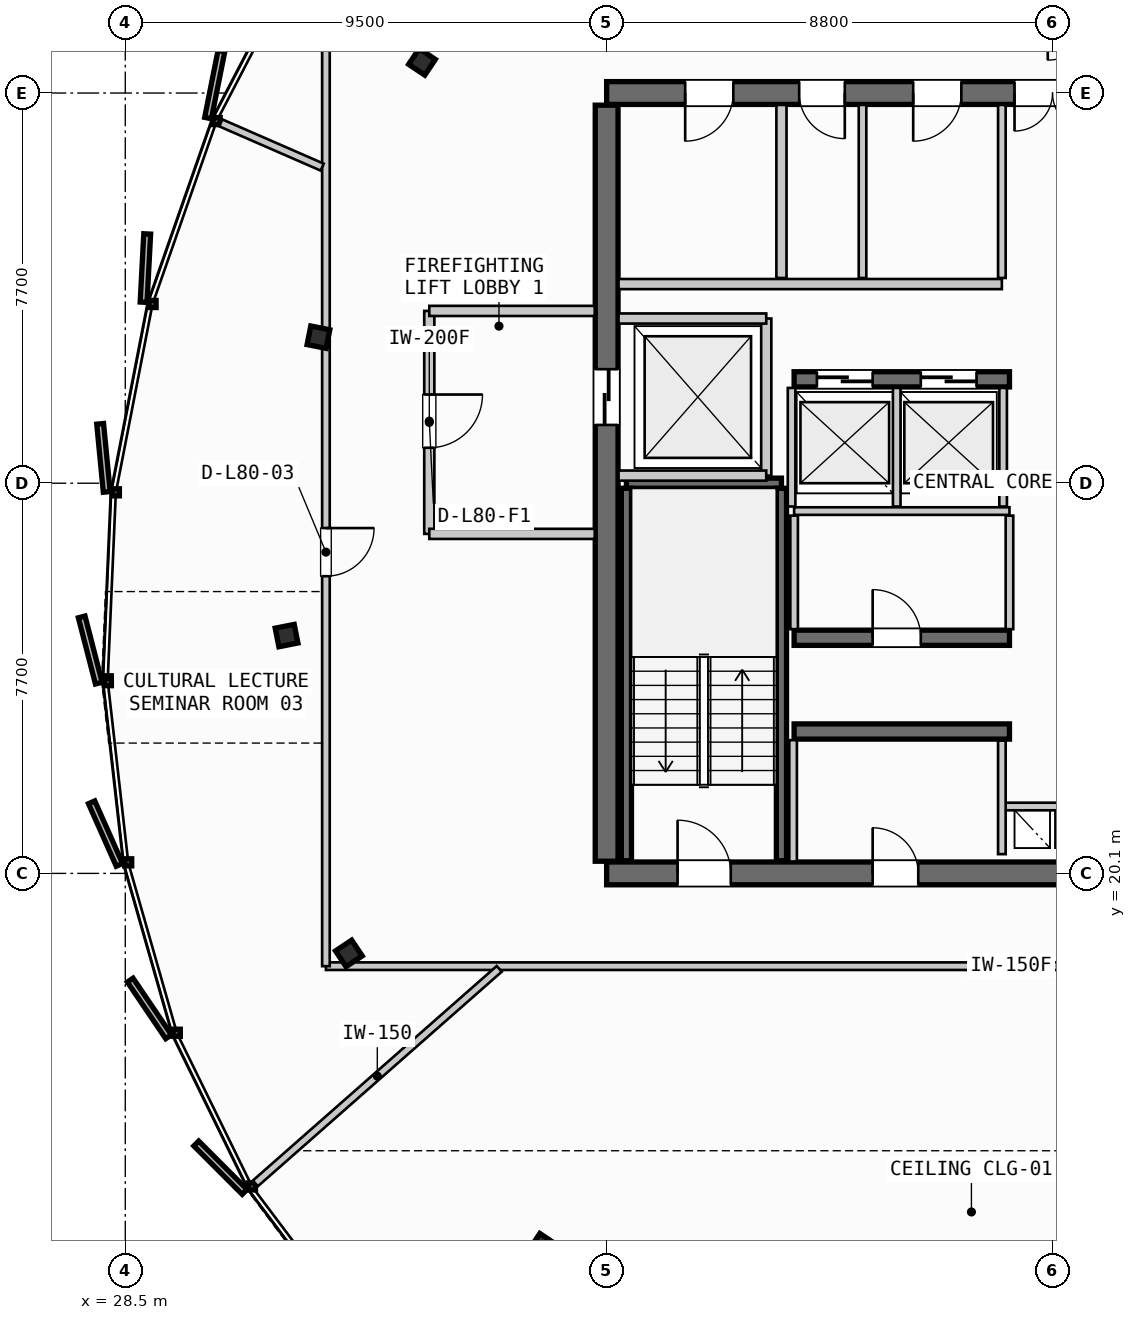
"""IFC4 building model, lengths in metres.
Left out: names, types, materials, properties, quantities, classifications, styles, units other than length and angle.
Written with IfcOpenShell. Run it as: python <this file> out.ifc"""

import sys

from ifc_helpers import new_model, si_unit, direction, frame, frame_2d, origin, origin_2d, place, context, subcontext, project, spatial, rectangle, i_section, extrude, source, transform, mapped, element, fill, save


model = new_model("IFC4")
c1 = context("Model", 3, precision=1e-05, world=origin(), true_north=direction((0.0, 1.0)))
c2 = subcontext(c1, "Body", "Model", "MODEL_VIEW")
j1 = project(units=[si_unit("LENGTHUNIT", "METRE"), si_unit("PLANEANGLEUNIT", "RADIAN")], contexts=[c1])
p1 = place(None, origin())
s1 = spatial("IfcSite", under=j1, at=p1, CompositionType="ELEMENT")
p2 = place(p1, origin())
s2 = spatial("IfcBuilding", under=s1, at=p2, CompositionType="ELEMENT")
p3 = place(p2, frame((0.0, 0.0, 300.85)))
s3 = spatial("IfcBuildingStorey", under=s2, at=p3, CompositionType="ELEMENT", Elevation=300.85)
p4 = place(p3, frame((38.0, 20.1, 0.0), z_axis=(0.0, 0.0, 1.0), x_axis=(1.0, 0.0, 0.0)))
e1 = element("IfcWall", 1, at=p4, inside=s3, PredefinedType="SHEAR", context=c2, shape_type="SweptSolid", body=[
    extrude(rectangle(XDim=17.6, YDim=0.45, at=frame_2d((8.8, 0.0))), origin(), (0.0, 0.0, 1.0), 3.185),
])
p5 = place(p4, frame((1.4, 0.0, 0.0)))
e2 = element("IfcOpeningElement", 2, at=p5, cuts=e1, PredefinedType="OPENING", context=c2, shape_type="SweptSolid", body=[
    extrude(rectangle(XDim=1.05, YDim=2.15, at=frame_2d((0.525, 1.075))), frame((0.0, 0.235, 0.0), z_axis=(0.0, -1.0, 0.0), x_axis=(1.0, 0.0, 0.0)), (0.0, 0.0, 1.0), 0.47),
])
p6 = place(p4, frame((15.15, 0.0, 0.0)))
e3 = element("IfcOpeningElement", 3, at=p6, cuts=e1, PredefinedType="OPENING", context=c2, shape_type="SweptSolid", body=[
    extrude(rectangle(XDim=1.05, YDim=2.15, at=frame_2d((0.525, 1.075))), frame((0.0, 0.235, 0.0), z_axis=(0.0, -1.0, 0.0), x_axis=(1.0, 0.0, 0.0)), (0.0, 0.0, 1.0), 0.47),
])
p7 = place(p4, frame((5.25, 0.0, 0.0)))
e4 = element("IfcOpeningElement", 4, at=p7, cuts=e1, PredefinedType="OPENING", context=c2, shape_type="SweptSolid", body=[
    extrude(rectangle(XDim=0.9, YDim=2.15, at=frame_2d((0.45, 1.075))), frame((0.0, 0.235, 0.0), z_axis=(0.0, -1.0, 0.0), x_axis=(1.0, 0.0, 0.0)), (0.0, 0.0, 1.0), 0.47),
])
p8 = place(p4, frame((11.4, 0.0, 0.0)))
e5 = element("IfcOpeningElement", 5, at=p8, cuts=e1, PredefinedType="OPENING", context=c2, shape_type="SweptSolid", body=[
    extrude(rectangle(XDim=0.95, YDim=2.15, at=frame_2d((0.475, 1.075))), frame((0.0, 0.235, 0.0), z_axis=(0.0, -1.0, 0.0), x_axis=(1.0, 0.0, 0.0)), (0.0, 0.0, 1.0), 0.47),
])
p9 = place(p3, frame((55.6, 35.5, 0.0), z_axis=(0.0, 0.0, 1.0), x_axis=(-1.0, 0.0, 0.0)))
e6 = element("IfcWall", 6, at=p9, inside=s3, PredefinedType="SHEAR", context=c2, shape_type="SweptSolid", body=[
    extrude(rectangle(XDim=17.6, YDim=0.45, at=frame_2d((8.8, 0.0))), origin(), (0.0, 0.0, 1.0), 3.185),
])
p10 = place(p9, frame((8.05, 0.0, 0.0)))
e7 = element("IfcOpeningElement", 7, at=p10, cuts=e6, PredefinedType="OPENING", context=c2, shape_type="SweptSolid", body=[
    extrude(rectangle(XDim=1.5, YDim=2.2, at=frame_2d((0.75, 1.1))), frame((0.0, 0.235, 0.0), z_axis=(0.0, -1.0, 0.0), x_axis=(1.0, 0.0, 0.0)), (0.0, 0.0, 1.0), 0.47),
])
p11 = place(p9, frame((15.1, 0.0, 0.0)))
e8 = element("IfcOpeningElement", 8, at=p11, cuts=e6, PredefinedType="OPENING", context=c2, shape_type="SweptSolid", body=[
    extrude(rectangle(XDim=0.95, YDim=2.15, at=frame_2d((0.475, 1.075))), frame((0.0, 0.235, 0.0), z_axis=(0.0, -1.0, 0.0), x_axis=(1.0, 0.0, 0.0)), (0.0, 0.0, 1.0), 0.47),
])
p12 = place(p9, frame((12.9, 0.0, 0.0)))
e9 = element("IfcOpeningElement", 9, at=p12, cuts=e6, PredefinedType="OPENING", context=c2, shape_type="SweptSolid", body=[
    extrude(rectangle(XDim=0.9, YDim=2.15, at=frame_2d((0.45, 1.075))), frame((0.0, 0.235, 0.0), z_axis=(0.0, -1.0, 0.0), x_axis=(1.0, 0.0, 0.0)), (0.0, 0.0, 1.0), 0.47),
])
p13 = place(p9, frame((10.6, 0.0, 0.0)))
e10 = element("IfcOpeningElement", 10, at=p13, cuts=e6, PredefinedType="OPENING", context=c2, shape_type="SweptSolid", body=[
    extrude(rectangle(XDim=0.95, YDim=2.15, at=frame_2d((0.475, 1.075))), frame((0.0, 0.235, 0.0), z_axis=(0.0, -1.0, 0.0), x_axis=(1.0, 0.0, 0.0)), (0.0, 0.0, 1.0), 0.47),
])
p14 = place(p3, frame((38.0, 35.26, 0.0), z_axis=(0.0, 0.0, 1.0), x_axis=(0.0, -1.0, 0.0)))
e11 = element("IfcWall", 11, at=p14, inside=s3, PredefinedType="SHEAR", context=c2, shape_type="SweptSolid", body=[
    extrude(rectangle(XDim=14.92, YDim=0.45, at=frame_2d((7.46, 0.0))), origin(), (0.0, 0.0, 1.0), 3.185),
])
p15 = place(p14, frame((5.21, 0.0, 0.0)))
e12 = element("IfcOpeningElement", 12, at=p15, cuts=e11, PredefinedType="OPENING", context=c2, shape_type="SweptSolid", body=[
    extrude(rectangle(XDim=1.1, YDim=2.2, at=frame_2d((0.55, 1.1))), frame((0.0, 0.235, 0.0), z_axis=(0.0, -1.0, 0.0), x_axis=(1.0, 0.0, 0.0)), (0.0, 0.0, 1.0), 0.47),
])
p16 = place(p3, frame((41.7, 22.9, 0.0), z_axis=(0.0, 0.0, 1.0), x_axis=(1.0, 0.0, 0.0)))
e13 = element("IfcWall", 13, at=p16, inside=s3, PredefinedType="SHEAR", context=c2, shape_type="SweptSolid", body=[
    extrude(rectangle(XDim=4.25, YDim=0.3, at=frame_2d((2.125, 0.0))), origin(), (0.0, 0.0, 1.0), 3.185),
])
p17 = place(p3, frame((41.7, 24.75, 0.0), z_axis=(0.0, 0.0, 1.0), x_axis=(1.0, 0.0, 0.0)))
e14 = element("IfcWall", 14, at=p17, inside=s3, PredefinedType="SHEAR", context=c2, shape_type="SweptSolid", body=[
    extrude(rectangle(XDim=4.25, YDim=0.3, at=frame_2d((2.125, 0.0))), origin(), (0.0, 0.0, 1.0), 3.185),
])
p18 = place(p17, frame((1.55, 0.0, 0.0)))
e15 = element("IfcOpeningElement", 15, at=p18, cuts=e14, PredefinedType="OPENING", context=c2, shape_type="SweptSolid", body=[
    extrude(rectangle(XDim=0.95, YDim=2.15, at=frame_2d((0.475, 1.075))), frame((0.0, 0.16, 0.0), z_axis=(0.0, -1.0, 0.0), x_axis=(1.0, 0.0, 0.0)), (0.0, 0.0, 1.0), 0.32),
])
p19 = place(p3, frame((41.7, 29.85, 0.0), z_axis=(0.0, 0.0, 1.0), x_axis=(1.0, 0.0, 0.0)))
e16 = element("IfcWall", 16, at=p19, inside=s3, PredefinedType="SHEAR", context=c2, shape_type="SweptSolid", body=[
    extrude(rectangle(XDim=4.25, YDim=0.3, at=frame_2d((2.125, 0.0))), origin(), (0.0, 0.0, 1.0), 3.185),
])
p20 = place(p19, frame((0.45, 0.0, 0.0)))
e17 = element("IfcOpeningElement", 17, at=p20, cuts=e16, PredefinedType="OPENING", context=c2, shape_type="SweptSolid", body=[
    extrude(rectangle(XDim=1.1, YDim=2.2, at=frame_2d((0.55, 1.1))), frame((0.0, 0.16, 0.0), z_axis=(0.0, -1.0, 0.0), x_axis=(1.0, 0.0, 0.0)), (0.0, 0.0, 1.0), 0.32),
])
p21 = place(p19, frame((2.5, 0.0, 0.0)))
e18 = element("IfcOpeningElement", 18, at=p21, cuts=e16, PredefinedType="OPENING", context=c2, shape_type="SweptSolid", body=[
    extrude(rectangle(XDim=1.1, YDim=2.2, at=frame_2d((0.55, 1.1))), frame((0.0, 0.16, 0.0), z_axis=(0.0, -1.0, 0.0), x_axis=(1.0, 0.0, 0.0)), (0.0, 0.0, 1.0), 0.32),
])
m1 = source(origin(), c2, "Body", "SweptSolid", [
    extrude(i_section(OverallWidth=0.374, OverallDepth=0.383, WebThickness=0.017, FlangeThickness=0.026, FilletRadius=0.015, at=origin_2d()), origin(), (0.0, 0.0, 1.0), 3.185),
])
for number, where, z_axis, x_axis in (
    (19, (34.356, 36.115, 0.0), (0.0, 0.0, 1.0), (-0.831, 0.556, 0.0)),
    (20, (32.312, 30.682, 0.0), (0.0, 0.0, 1.0), (-0.981, 0.195, 0.0)),
    (21, (31.683, 24.793, 0.0), (0.0, 0.0, 1.0), (-0.981, -0.195, 0.0)),
    (22, (32.913, 18.521, 0.0), (0.0, 0.0, 1.0), (-0.831, -0.556, 0.0)),
    (23, (36.731, 12.731, 0.0), (0.0, 0.0, 1.0), (-0.556, -0.831, 0.0)),
):
    element("IfcColumn", number, at=place(p3, frame(where, z_axis=z_axis, x_axis=x_axis)), inside=s3, PredefinedType="COLUMN", context=c2, shape_type="MappedRepresentation", body=[
        mapped(m1, transform((0.0, 0.0, 0.0), scale=1.0)),
    ])
p22 = place(p3, frame((38.39, 27.8, 0.0), z_axis=(0.0, 0.0, 1.0), x_axis=(1.0, 0.0, 0.0)))
e24 = element("IfcWall", 24, at=p22, inside=s3, PredefinedType="SHEAR", context=c2, shape_type="SweptSolid", body=[
    extrude(rectangle(XDim=3.06, YDim=0.2, at=frame_2d((1.53, 0.0))), origin(), (0.0, 0.0, 1.0), 3.185),
])
for number, where, z_axis, x_axis in (
    (25, (41.45, 27.7, 0.0), (0.0, 0.0, 1.0), (0.0, -1.0, 0.0)),
    (26, (38.39, 20.35, 0.0), (0.0, 0.0, 1.0), (0.0, 1.0, 0.0)),
):
    element("IfcWall", number, at=place(p3, frame(where, z_axis=z_axis, x_axis=x_axis)), inside=s3, PredefinedType="SHEAR", context=c2, shape_type="SweptSolid", body=[
        extrude(rectangle(XDim=7.35, YDim=0.2, at=frame_2d((3.675, 0.0))), origin(), (0.0, 0.0, 1.0), 3.185),
    ])
p23 = place(p3, frame((45.8, 21.42, 0.0), z_axis=(0.0, 0.0, 1.0), x_axis=(1.0, 0.0, 0.0)))
e27 = element("IfcWall", 27, at=p23, inside=s3, PredefinedType="PARTITIONING", context=c2, shape_type="SweptSolid", body=[
    extrude(rectangle(XDim=2.0, YDim=0.15, at=frame_2d((1.0, 0.0))), origin(), (0.0, 0.0, 1.0), 2.28),
])
p24 = place(p3, frame((45.8, 20.48, 0.0), z_axis=(0.0, 0.0, 1.0), x_axis=(0.0, 1.0, 0.0)))
e28 = element("IfcWall", 28, at=p24, inside=s3, PredefinedType="PARTITIONING", context=c2, shape_type="SweptSolid", body=[
    extrude(rectangle(XDim=2.24, YDim=0.15, at=frame_2d((1.12, 0.0))), origin(), (0.0, 0.0, 1.0), 2.28),
])
p25 = place(p3, frame((41.15, 27.95, 0.0), z_axis=(0.0, 0.0, 1.0), x_axis=(0.0, 1.0, 0.0)))
e29 = element("IfcWall", 29, at=p25, inside=s3, PredefinedType="PARTITIONING", context=c2, shape_type="SweptSolid", body=[
    extrude(rectangle(XDim=3.1, YDim=0.2, at=frame_2d((1.55, 0.0))), origin(), (0.0, 0.0, 1.0), 2.28),
])
for number, where, z_axis, x_axis in (
    (30, (38.235, 27.95, 0.0), (0.0, 0.0, 1.0), (1.0, 0.0, 0.0)),
    (31, (38.235, 31.05, 0.0), (0.0, 0.0, 1.0), (1.0, 0.0, 0.0)),
):
    element("IfcWall", number, at=place(p3, frame(where, z_axis=z_axis, x_axis=x_axis)), inside=s3, PredefinedType="PARTITIONING", context=c2, shape_type="SweptSolid", body=[
        extrude(rectangle(XDim=2.915, YDim=0.2, at=frame_2d((1.458, 0.0))), origin(), (0.0, 0.0, 1.0), 2.28),
    ])
p26 = place(p3, frame((34.5, 31.2, 0.0), z_axis=(0.0, 0.0, 1.0), x_axis=(0.0, -1.0, 0.0)))
e32 = element("IfcWall", 32, at=p26, inside=s3, PredefinedType="PARTITIONING", context=c2, shape_type="SweptSolid", body=[
    extrude(rectangle(XDim=4.4, YDim=0.2, at=frame_2d((2.2, 0.0))), origin(), (0.0, 0.0, 1.0), 2.28),
])
p27 = place(p26, frame((1.65, 0.0, 0.0)))
e33 = element("IfcOpeningElement", 33, at=p27, cuts=e32, PredefinedType="OPENING", context=c2, shape_type="SweptSolid", body=[
    extrude(rectangle(XDim=1.05, YDim=2.15, at=frame_2d((0.525, 1.075))), frame((0.0, 0.11, 0.0), z_axis=(0.0, -1.0, 0.0), x_axis=(1.0, 0.0, 0.0)), (0.0, 0.0, 1.0), 0.22),
])
for number, where, z_axis, x_axis in (
    (34, (34.5, 26.8, 0.0), (0.0, 0.0, 1.0), (1.0, 0.0, 0.0)),
    (35, (34.5, 31.2, 0.0), (0.0, 0.0, 1.0), (1.0, 0.0, 0.0)),
):
    element("IfcWall", number, at=place(p3, frame(where, z_axis=z_axis, x_axis=x_axis)), inside=s3, PredefinedType="PARTITIONING", context=c2, shape_type="SweptSolid", body=[
        extrude(rectangle(XDim=3.265, YDim=0.2, at=frame_2d((1.632, 0.0))), origin(), (0.0, 0.0, 1.0), 2.28),
    ])
p28 = place(p3, frame((41.68, 20.335, 0.0), z_axis=(0.0, 0.0, 1.0), x_axis=(0.0, 1.0, 0.0)))
e36 = element("IfcWall", 36, at=p28, inside=s3, PredefinedType="PARTITIONING", context=c2, shape_type="SweptSolid", body=[
    extrude(rectangle(XDim=2.395, YDim=0.15, at=frame_2d((1.198, 0.0))), origin(), (0.0, 0.0, 1.0), 2.28),
])
p29 = place(p3, frame((41.7, 27.25, 0.0), z_axis=(0.0, 0.0, 1.0), x_axis=(1.0, 0.0, 0.0)))
e37 = element("IfcWall", 37, at=p29, inside=s3, PredefinedType="PARTITIONING", context=c2, shape_type="SweptSolid", body=[
    extrude(rectangle(XDim=4.25, YDim=0.15, at=frame_2d((2.125, 0.0))), origin(), (0.0, 0.0, 1.0), 2.28),
])
for number, where, z_axis, x_axis in (
    (38, (41.7, 24.92, 0.0), (0.0, 0.0, 1.0), (0.0, 1.0, 0.0)),
    (39, (45.95, 24.92, 0.0), (0.0, 0.0, 1.0), (0.0, 1.0, 0.0)),
):
    element("IfcWall", number, at=place(p3, frame(where, z_axis=z_axis, x_axis=x_axis)), inside=s3, PredefinedType="PARTITIONING", context=c2, shape_type="SweptSolid", body=[
        extrude(rectangle(XDim=2.24, YDim=0.15, at=frame_2d((1.12, 0.0))), origin(), (0.0, 0.0, 1.0), 2.28),
    ])
for number, where, z_axis, x_axis in (
    (40, (41.65, 27.34, 0.0), (0.0, 0.0, 1.0), (0.0, 1.0, 0.0)),
    (41, (43.725, 27.34, 0.0), (0.0, 0.0, 1.0), (0.0, 1.0, 0.0)),
    (42, (45.825, 27.34, 0.0), (0.0, 0.0, 1.0), (0.0, 1.0, 0.0)),
):
    element("IfcWall", number, at=place(p3, frame(where, z_axis=z_axis, x_axis=x_axis)), inside=s3, PredefinedType="PARTITIONING", context=c2, shape_type="SweptSolid", body=[
        extrude(rectangle(XDim=2.34, YDim=0.15, at=frame_2d((1.17, 0.0))), origin(), (0.0, 0.0, 1.0), 2.28),
    ])
p30 = place(p3, frame((41.45, 31.85, 0.0), z_axis=(0.0, 0.0, 1.0), x_axis=(0.0, 1.0, 0.0)))
e43 = element("IfcWall", 43, at=p30, inside=s3, PredefinedType="PARTITIONING", context=c2, shape_type="SweptSolid", body=[
    extrude(rectangle(XDim=3.415, YDim=0.2, at=frame_2d((1.708, 0.0))), origin(), (0.0, 0.0, 1.0), 2.28),
])
p31 = place(p3, frame((38.235, 31.73, 0.0), z_axis=(0.0, 0.0, 1.0), x_axis=(1.0, 0.0, 0.0)))
e44 = element("IfcWall", 44, at=p31, inside=s3, PredefinedType="PARTITIONING", context=c2, shape_type="SweptSolid", body=[
    extrude(rectangle(XDim=7.565, YDim=0.2, at=frame_2d((3.782, 0.0))), origin(), (0.0, 0.0, 1.0), 2.28),
])
p32 = place(p3, frame((45.8, 31.85, 0.0), z_axis=(0.0, 0.0, 1.0), x_axis=(0.0, 1.0, 0.0)))
e45 = element("IfcWall", 45, at=p32, inside=s3, PredefinedType="PARTITIONING", context=c2, shape_type="SweptSolid", body=[
    extrude(rectangle(XDim=3.415, YDim=0.15, at=frame_2d((1.708, 0.0))), origin(), (0.0, 0.0, 1.0), 2.28),
])
p33 = place(p3, frame((43.05, 31.85, 0.0), z_axis=(0.0, 0.0, 1.0), x_axis=(0.0, 1.0, 0.0)))
e46 = element("IfcWall", 46, at=p33, inside=s3, PredefinedType="PLUMBINGWALL", context=c2, shape_type="SweptSolid", body=[
    extrude(rectangle(XDim=3.415, YDim=0.15, at=frame_2d((1.708, 0.0))), origin(), (0.0, 0.0, 1.0), 2.28),
])
p34 = place(p3, frame((32.46, 18.269, 0.0), z_axis=(0.0, 0.0, 1.0), x_axis=(1.0, 0.0, 0.0)))
e47 = element("IfcWall", 47, at=p34, inside=s3, PredefinedType="PARTITIONING", context=c2, shape_type="SweptSolid", body=[
    extrude(rectangle(XDim=29.442, YDim=0.15, at=frame_2d((14.721, 0.0))), origin(), (0.0, 0.0, 1.0), 2.28),
])
p35 = place(p34, frame((15.274, 0.0, 0.0)))
e48 = element("IfcOpeningElement", 48, at=p35, cuts=e47, PredefinedType="OPENING", context=c2, shape_type="SweptSolid", body=[
    extrude(rectangle(XDim=0.95, YDim=2.15, at=frame_2d((0.475, 1.075))), frame((0.0, 0.085, 0.0), z_axis=(0.0, -1.0, 0.0), x_axis=(1.0, 0.0, 0.0)), (0.0, 0.0, 1.0), 0.17),
])
p36 = place(p3, frame((32.46, 37.1, 0.0), z_axis=(0.0, 0.0, 1.0), x_axis=(0.0, -1.0, 0.0)))
e49 = element("IfcWall", 49, at=p36, inside=s3, PredefinedType="PARTITIONING", context=c2, shape_type="SweptSolid", body=[
    extrude(rectangle(XDim=18.831, YDim=0.15, at=frame_2d((9.416, 0.0))), origin(), (0.0, 0.0, 1.0), 2.28),
])
p37 = place(p36, frame((10.185, 0.0, 0.0)))
e50 = element("IfcOpeningElement", 50, at=p37, cuts=e49, PredefinedType="OPENING", context=c2, shape_type="SweptSolid", body=[
    extrude(rectangle(XDim=0.95, YDim=2.15, at=frame_2d((0.475, 1.075))), frame((0.0, 0.085, 0.0), z_axis=(0.0, -1.0, 0.0), x_axis=(1.0, 0.0, 0.0)), (0.0, 0.0, 1.0), 0.17),
])
p38 = place(p3, frame((35.88, 18.216, 0.0), z_axis=(0.0, 0.0, 1.0), x_axis=(-0.750830608128, -0.660494812923, 0.0)))
e51 = element("IfcWall", 51, at=p38, inside=s3, PredefinedType="PARTITIONING", context=c2, shape_type="SweptSolid", body=[
    extrude(rectangle(XDim=6.411, YDim=0.15, at=frame_2d((3.205, 0.0))), origin(), (0.0, 0.0, 1.0), 2.28),
])
p39 = place(p3, frame((32.387, 34.037, 0.0), z_axis=(0.0, 0.0, 1.0), x_axis=(-0.916516272794, 0.399997402121, 0.0)))
e52 = element("IfcWall", 52, at=p39, inside=s3, PredefinedType="PARTITIONING", context=c2, shape_type="SweptSolid", body=[
    extrude(rectangle(XDim=2.183, YDim=0.15, at=frame_2d((1.092, 0.0))), origin(), (0.0, 0.0, 1.0), 2.28),
])
m2 = source(origin(), c2, "Body", "SweptSolid", [
    extrude(rectangle(XDim=1.05, YDim=2.15, at=frame_2d((0.525, 1.075))), frame((0.0, 0.025, 0.0), z_axis=(0.0, -1.0, 0.0), x_axis=(1.0, 0.0, 0.0)), (0.0, 0.0, 1.0), 0.05),
])
p40 = place(p5, origin())
e53 = element("IfcDoor", 53, at=p40, inside=s3, OperationType="SINGLE_SWING_LEFT", PredefinedType="DOOR", context=c2, shape_type="MappedRepresentation", body=[
    mapped(m2, transform((0.0, 0.0, 0.0), scale=1.0)),
])
fill(e2, e53)
m3 = source(origin(), c2, "Body", "SweptSolid", [
    extrude(rectangle(XDim=1.5, YDim=2.2, at=frame_2d((0.75, 1.1))), frame((0.0, 0.025, 0.0), z_axis=(0.0, -1.0, 0.0), x_axis=(1.0, 0.0, 0.0)), (0.0, 0.0, 1.0), 0.05),
])
p41 = place(p10, origin())
e54 = element("IfcDoor", 54, at=p41, inside=s3, OperationType="DOUBLE_DOOR_SINGLE_SWING", PredefinedType="DOOR", context=c2, shape_type="MappedRepresentation", body=[
    mapped(m3, transform((0.0, 0.0, 0.0), scale=1.0)),
])
fill(e7, e54)
m4 = source(origin(), c2, "Body", "SweptSolid", [
    extrude(rectangle(XDim=1.1, YDim=2.2, at=frame_2d((0.55, 1.1))), frame((0.0, 0.025, 0.0), z_axis=(0.0, -1.0, 0.0), x_axis=(1.0, 0.0, 0.0)), (0.0, 0.0, 1.0), 0.05),
])
p42 = place(p15, origin())
e55 = element("IfcDoor", 55, at=p42, inside=s3, OperationType="SLIDING_TO_LEFT", PredefinedType="DOOR", context=c2, shape_type="MappedRepresentation", body=[
    mapped(m4, transform((0.0, 0.0, 0.0), scale=1.0)),
])
fill(e12, e55)
m5 = source(origin(), c2, "Body", "SweptSolid", [
    extrude(rectangle(XDim=0.9, YDim=2.15, at=frame_2d((0.45, 1.075))), frame((0.0, 0.025, 0.0), z_axis=(0.0, -1.0, 0.0), x_axis=(1.0, 0.0, 0.0)), (0.0, 0.0, 1.0), 0.05),
])
p43 = place(p7, origin())
e56 = element("IfcDoor", 56, at=p43, inside=s3, OperationType="SINGLE_SWING_LEFT", PredefinedType="DOOR", context=c2, shape_type="MappedRepresentation", body=[
    mapped(m5, transform((0.0, 0.0, 0.0), scale=1.0)),
])
fill(e4, e56)
m6 = source(origin(), c2, "Body", "SweptSolid", [
    extrude(rectangle(XDim=0.95, YDim=2.15, at=frame_2d((0.475, 1.075))), frame((0.0, 0.025, 0.0), z_axis=(0.0, -1.0, 0.0), x_axis=(1.0, 0.0, 0.0)), (0.0, 0.0, 1.0), 0.05),
])
p44 = place(p18, origin())
e57 = element("IfcDoor", 57, at=p44, inside=s3, OperationType="SINGLE_SWING_LEFT", PredefinedType="DOOR", context=c2, shape_type="MappedRepresentation", body=[
    mapped(m6, transform((0.0, 0.0, 0.0), scale=1.0)),
])
fill(e15, e57)
p45 = place(p20, origin())
e58 = element("IfcDoor", 58, at=p45, inside=s3, OperationType="SLIDING_TO_LEFT", PredefinedType="DOOR", context=c2, shape_type="MappedRepresentation", body=[
    mapped(m4, transform((0.0, 0.0, 0.0), scale=1.0)),
])
fill(e17, e58)
p46 = place(p21, origin())
e59 = element("IfcDoor", 59, at=p46, inside=s3, OperationType="SLIDING_TO_LEFT", PredefinedType="DOOR", context=c2, shape_type="MappedRepresentation", body=[
    mapped(m4, transform((0.0, 0.0, 0.0), scale=1.0)),
])
fill(e18, e59)
p47 = place(p11, origin())
e60 = element("IfcDoor", 60, at=p47, inside=s3, OperationType="SINGLE_SWING_RIGHT", PredefinedType="DOOR", context=c2, shape_type="MappedRepresentation", body=[
    mapped(m6, transform((0.0, 0.0, 0.0), scale=1.0)),
])
fill(e8, e60)
p48 = place(p12, origin())
e61 = element("IfcDoor", 61, at=p48, inside=s3, OperationType="SINGLE_SWING_LEFT", PredefinedType="DOOR", context=c2, shape_type="MappedRepresentation", body=[
    mapped(m5, transform((0.0, 0.0, 0.0), scale=1.0)),
])
fill(e9, e61)
p49 = place(p13, origin())
e62 = element("IfcDoor", 62, at=p49, inside=s3, OperationType="SINGLE_SWING_RIGHT", PredefinedType="DOOR", context=c2, shape_type="MappedRepresentation", body=[
    mapped(m6, transform((0.0, 0.0, 0.0), scale=1.0)),
])
fill(e10, e62)
p50 = place(p27, origin())
e63 = element("IfcDoor", 63, at=p50, inside=s3, OperationType="SINGLE_SWING_LEFT", PredefinedType="DOOR", context=c2, shape_type="MappedRepresentation", body=[
    mapped(m2, transform((0.0, 0.0, 0.0), scale=1.0)),
])
fill(e33, e63)
p51 = place(p37, origin())
e64 = element("IfcDoor", 64, at=p51, inside=s3, OperationType="SINGLE_SWING_LEFT", PredefinedType="DOOR", context=c2, shape_type="MappedRepresentation", body=[
    mapped(m6, transform((0.0, 0.0, 0.0), scale=1.0)),
])
fill(e50, e64)
save(model, sys.argv[1])
